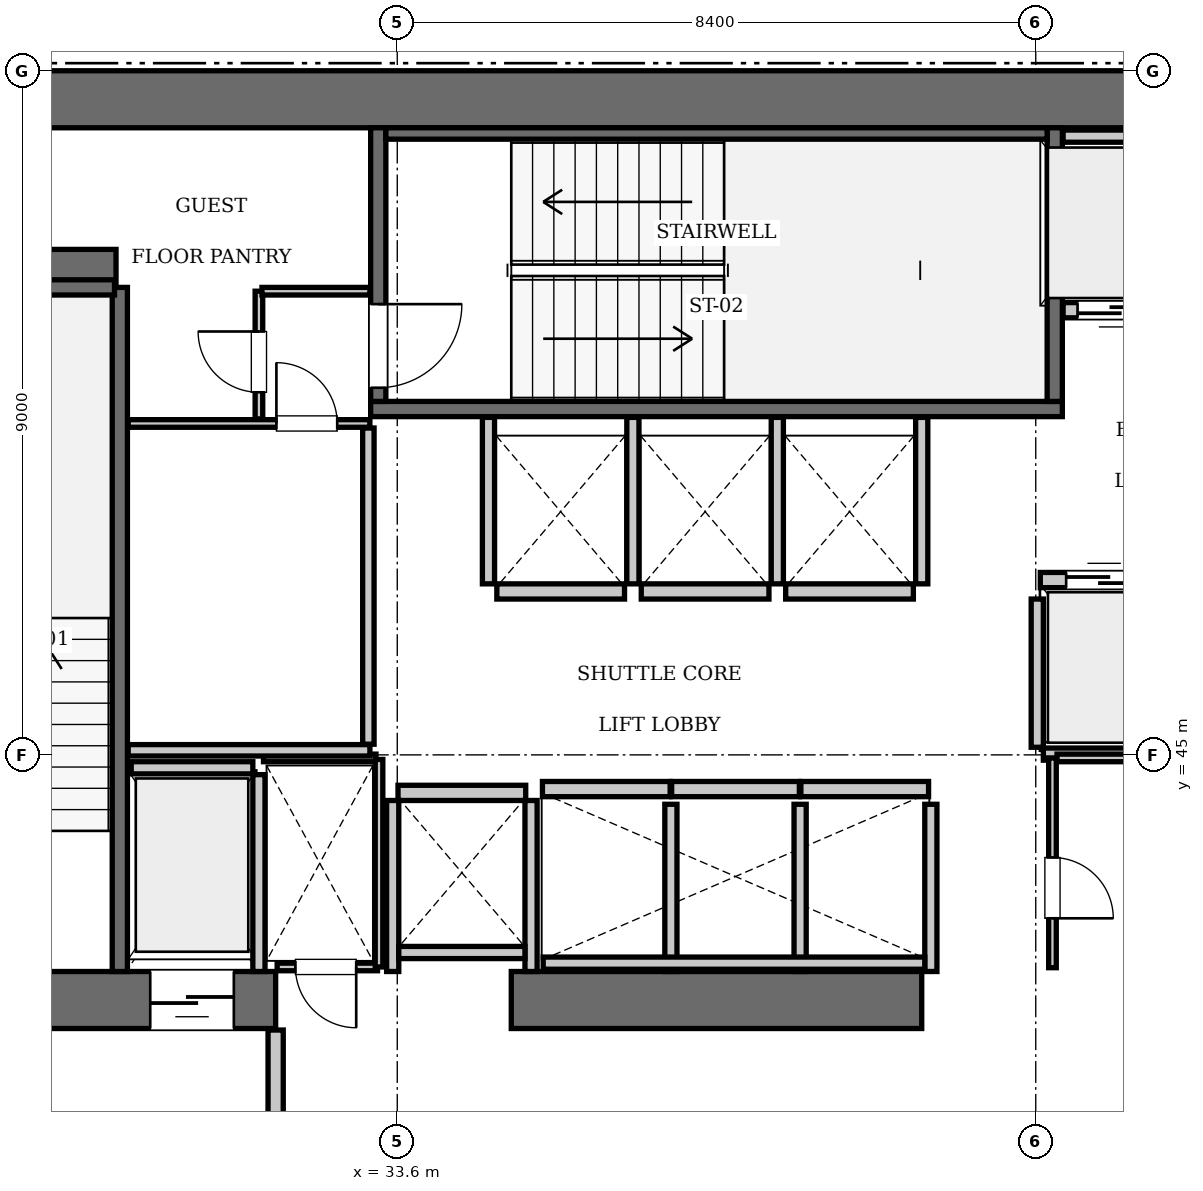
"""IFC4 building model, lengths in metres.
Left out: names, types, materials, properties, quantities, classifications, styles, units other than length and angle.
Written with IfcOpenShell. Run it as: python <this file> out.ifc"""

import sys

from ifc_helpers import new_model, si_unit, direction, frame, frame_2d, origin, place, context, subcontext, project, spatial, rectangle, extrude, element, fill, save


model = new_model("IFC4")
c1 = context("Model", 3, precision=1e-05, world=origin(), true_north=direction((0.0, 1.0)))
c2 = subcontext(c1, "Body", "Model", "MODEL_VIEW")
j1 = project(units=[si_unit("LENGTHUNIT", "METRE"), si_unit("PLANEANGLEUNIT", "RADIAN")], contexts=[c1])
p1 = place(None, origin())
s1 = spatial("IfcSite", under=j1, at=p1, CompositionType="ELEMENT")
p2 = place(p1, origin())
s2 = spatial("IfcBuilding", under=s1, at=p2, CompositionType="ELEMENT")
p3 = place(p2, frame((0.0, 0.0, 165.9)))
s3 = spatial("IfcBuildingStorey", under=s2, at=p3, CompositionType="ELEMENT", Elevation=165.9)
p4 = place(p3, frame((25.2, 53.625, 0.0), z_axis=(0.0, 0.0, 1.0), x_axis=(1.0, 0.0, 0.0)))
e1 = element("IfcWall", 1, at=p4, inside=s3, PredefinedType="SHEAR", context=c2, shape_type="SweptSolid", body=[
    extrude(rectangle(XDim=25.2, YDim=0.75, at=frame_2d((12.6, 0.0))), origin(), (0.0, 0.0, 1.0), 3.85),
])
p5 = place(p3, frame((25.2, 41.775, 0.0), z_axis=(0.0, 0.0, 1.0), x_axis=(1.0, 0.0, 0.0)))
e2 = element("IfcWall", 2, at=p5, inside=s3, PredefinedType="SHEAR", context=c2, shape_type="SweptSolid", body=[
    extrude(rectangle(XDim=6.8, YDim=0.75, at=frame_2d((3.4, 0.0))), origin(), (0.0, 0.0, 1.0), 3.85),
])
p6 = place(p5, frame((1.65, 0.0, 0.0)))
e3 = element("IfcOpeningElement", 3, at=p6, cuts=e2, PredefinedType="OPENING", context=c2, shape_type="SweptSolid", body=[
    extrude(rectangle(XDim=1.15, YDim=2.15, at=frame_2d((0.575, 1.075))), frame((0.0, 0.385, 0.0), z_axis=(0.0, -1.0, 0.0), x_axis=(1.0, 0.0, 0.0)), (0.0, 0.0, 1.0), 0.77),
])
p7 = place(p5, frame((5.15, 0.0, 0.0)))
e4 = element("IfcOpeningElement", 4, at=p7, cuts=e2, PredefinedType="OPENING", context=c2, shape_type="SweptSolid", body=[
    extrude(rectangle(XDim=1.1, YDim=2.2, at=frame_2d((0.55, 1.1))), frame((0.0, 0.385, 0.0), z_axis=(0.0, -1.0, 0.0), x_axis=(1.0, 0.0, 0.0)), (0.0, 0.0, 1.0), 0.77),
])
p8 = place(p3, frame((35.1, 41.775, 0.0), z_axis=(0.0, 0.0, 1.0), x_axis=(1.0, 0.0, 0.0)))
e5 = element("IfcWall", 5, at=p8, inside=s3, PredefinedType="SHEAR", context=c2, shape_type="SweptSolid", body=[
    extrude(rectangle(XDim=5.4, YDim=0.75, at=frame_2d((2.7, 0.0))), origin(), (0.0, 0.0, 1.0), 3.85),
])
p9 = place(p3, frame((25.95, 51.4, 0.0), z_axis=(0.0, 0.0, 1.0), x_axis=(1.0, 0.0, 0.0)))
e6 = element("IfcWall", 6, at=p9, inside=s3, PredefinedType="SHEAR", context=c2, shape_type="SweptSolid", body=[
    extrude(rectangle(XDim=3.95, YDim=0.5, at=frame_2d((1.975, 0.0))), origin(), (0.0, 0.0, 1.0), 3.85),
])
p10 = place(p3, frame((29.95, 42.15, 0.0), z_axis=(0.0, 0.0, 1.0), x_axis=(0.0, 1.0, 0.0)))
e7 = element("IfcWall", 7, at=p10, inside=s3, PredefinedType="SOLIDWALL", context=c2, shape_type="SweptSolid", body=[
    extrude(rectangle(XDim=9.0, YDim=0.2, at=frame_2d((4.5, 0.0))), origin(), (0.0, 0.0, 1.0), 3.61),
])
p11 = place(p3, frame((26.38, 51.15, 0.0), z_axis=(0.0, 0.0, 1.0), x_axis=(1.0, 0.0, 0.0)))
e8 = element("IfcWall", 8, at=p11, inside=s3, PredefinedType="SOLIDWALL", context=c2, shape_type="SweptSolid", body=[
    extrude(rectangle(XDim=3.5, YDim=0.2, at=frame_2d((1.75, 0.0))), origin(), (0.0, 0.0, 1.0), 3.61),
])
p12 = place(p3, frame((33.25, 49.55, 0.0), z_axis=(0.0, 0.0, 1.0), x_axis=(1.0, 0.0, 0.0)))
e9 = element("IfcWall", 9, at=p12, inside=s3, PredefinedType="SOLIDWALL", context=c2, shape_type="SweptSolid", body=[
    extrude(rectangle(XDim=9.1, YDim=0.2, at=frame_2d((4.55, 0.0))), origin(), (0.0, 0.0, 1.0), 3.61),
])
p13 = place(p3, frame((42.25, 49.65, 0.0), z_axis=(0.0, 0.0, 1.0), x_axis=(0.0, 1.0, 0.0)))
e10 = element("IfcWall", 10, at=p13, inside=s3, PredefinedType="SOLIDWALL", context=c2, shape_type="SweptSolid", body=[
    extrude(rectangle(XDim=3.6, YDim=0.2, at=frame_2d((1.8, 0.0))), origin(), (0.0, 0.0, 1.0), 3.61),
])
p14 = place(p3, frame((33.35, 49.65, 0.0), z_axis=(0.0, 0.0, 1.0), x_axis=(0.0, 1.0, 0.0)))
e11 = element("IfcWall", 11, at=p14, inside=s3, PredefinedType="SOLIDWALL", context=c2, shape_type="SweptSolid", body=[
    extrude(rectangle(XDim=3.6, YDim=0.2, at=frame_2d((1.8, 0.0))), origin(), (0.0, 0.0, 1.0), 3.61),
])
p15 = place(p14, frame((0.18, 0.0, 0.0)))
e12 = element("IfcOpeningElement", 12, at=p15, cuts=e11, PredefinedType="OPENING", context=c2, shape_type="SweptSolid", body=[
    extrude(rectangle(XDim=1.1, YDim=2.15, at=frame_2d((0.55, 1.075))), frame((0.0, 0.11, 0.0), z_axis=(0.0, -1.0, 0.0), x_axis=(1.0, 0.0, 0.0)), (0.0, 0.0, 1.0), 0.22),
])
p16 = place(p3, frame((33.45, 53.175, 0.0), z_axis=(0.0, 0.0, 1.0), x_axis=(1.0, 0.0, 0.0)))
e13 = element("IfcWall", 13, at=p16, inside=s3, PredefinedType="SOLIDWALL", context=c2, shape_type="SweptSolid", body=[
    extrude(rectangle(XDim=8.7, YDim=0.15, at=frame_2d((4.35, 0.0))), origin(), (0.0, 0.0, 1.0), 3.61),
])
p17 = place(p3, frame((42.06, 47.3, 0.0), z_axis=(0.0, 0.0, 1.0), x_axis=(1.0, 0.0, 0.0)))
e14 = element("IfcWall", 14, at=p17, inside=s3, PredefinedType="SOLIDWALL", context=c2, shape_type="SweptSolid", body=[
    extrude(rectangle(XDim=1.68, YDim=0.2, at=frame_2d((0.84, 0.0))), origin(), (0.0, 0.0, 1.0), 3.61),
])
p18 = place(p17, frame((0.34, 0.0, 0.0)))
e15 = element("IfcOpeningElement", 15, at=p18, cuts=e14, PredefinedType="OPENING", context=c2, shape_type="SweptSolid", body=[
    extrude(rectangle(XDim=1.0, YDim=2.15, at=frame_2d((0.5, 1.075))), frame((0.0, 0.11, 0.0), z_axis=(0.0, -1.0, 0.0), x_axis=(1.0, 0.0, 0.0)), (0.0, 0.0, 1.0), 0.22),
])
p19 = place(p3, frame((42.36, 50.85, 0.0), z_axis=(0.0, 0.0, 1.0), x_axis=(1.0, 0.0, 0.0)))
e16 = element("IfcWall", 16, at=p19, inside=s3, PredefinedType="SOLIDWALL", context=c2, shape_type="SweptSolid", body=[
    extrude(rectangle(XDim=1.38, YDim=0.2, at=frame_2d((0.69, 0.0))), origin(), (0.0, 0.0, 1.0), 3.61),
])
p20 = place(p19, frame((0.19, 0.0, 0.0)))
e17 = element("IfcOpeningElement", 17, at=p20, cuts=e16, PredefinedType="OPENING", context=c2, shape_type="SweptSolid", body=[
    extrude(rectangle(XDim=1.0, YDim=2.15, at=frame_2d((0.5, 1.075))), frame((0.0, 0.11, 0.0), z_axis=(0.0, -1.0, 0.0), x_axis=(1.0, 0.0, 0.0)), (0.0, 0.0, 1.0), 0.22),
])
for number, where, z_axis, x_axis in (
    (18, (35.51, 44.55, 0.0), (0.0, 0.0, 1.0), (1.0, 0.0, 0.0)),
    (19, (37.21, 44.55, 0.0), (0.0, 0.0, 1.0), (1.0, 0.0, 0.0)),
):
    element("IfcWall", number, at=place(p3, frame(where, z_axis=z_axis, x_axis=x_axis)), inside=s3, PredefinedType="SOLIDWALL", context=c2, shape_type="SweptSolid", body=[
        extrude(rectangle(XDim=1.68, YDim=0.2, at=frame_2d((0.84, 0.0))), origin(), (0.0, 0.0, 1.0), 3.61),
    ])
for number, where, z_axis, x_axis in (
    (20, (38.91, 44.55, 0.0), (0.0, 0.0, 1.0), (1.0, 0.0, 0.0)),
    (21, (34.91, 47.15, 0.0), (0.0, 0.0, 1.0), (1.0, 0.0, 0.0)),
):
    element("IfcWall", number, at=place(p3, frame(where, z_axis=z_axis, x_axis=x_axis)), inside=s3, PredefinedType="SOLIDWALL", context=c2, shape_type="SweptSolid", body=[
        extrude(rectangle(XDim=1.68, YDim=0.2, at=frame_2d((0.84, 0.0))), origin(), (0.0, 0.0, 1.0), 3.61),
    ])
for number, where, z_axis, x_axis in (
    (22, (36.81, 47.15, 0.0), (0.0, 0.0, 1.0), (1.0, 0.0, 0.0)),
    (23, (38.71, 47.15, 0.0), (0.0, 0.0, 1.0), (1.0, 0.0, 0.0)),
    (24, (33.61, 44.5, 0.0), (0.0, 0.0, 1.0), (1.0, 0.0, 0.0)),
):
    element("IfcWall", number, at=place(p3, frame(where, z_axis=z_axis, x_axis=x_axis)), inside=s3, PredefinedType="SOLIDWALL", context=c2, shape_type="SweptSolid", body=[
        extrude(rectangle(XDim=1.68, YDim=0.2, at=frame_2d((0.84, 0.0))), origin(), (0.0, 0.0, 1.0), 3.61),
    ])
p21 = place(p3, frame((30.1, 44.83, 0.0), z_axis=(0.0, 0.0, 1.0), x_axis=(1.0, 0.0, 0.0)))
e25 = element("IfcWall", 25, at=p21, inside=s3, PredefinedType="SOLIDWALL", context=c2, shape_type="SweptSolid", body=[
    extrude(rectangle(XDim=1.6, YDim=0.16, at=frame_2d((0.8, 0.0))), origin(), (0.0, 0.0, 1.0), 3.61),
])
p22 = place(p3, frame((31.78, 42.15, 0.0), z_axis=(0.0, 0.0, 1.0), x_axis=(0.0, 1.0, 0.0)))
e26 = element("IfcWall", 26, at=p22, inside=s3, PredefinedType="SOLIDWALL", context=c2, shape_type="SweptSolid", body=[
    extrude(rectangle(XDim=2.59, YDim=0.16, at=frame_2d((1.295, 0.0))), origin(), (0.0, 0.0, 1.0), 3.61),
])
p23 = place(p3, frame((42.02, 45.1, 0.0), z_axis=(0.0, 0.0, 1.0), x_axis=(0.0, 1.0, 0.0)))
e27 = element("IfcWall", 27, at=p23, inside=s3, PredefinedType="SOLIDWALL", context=c2, shape_type="SweptSolid", body=[
    extrude(rectangle(XDim=1.95, YDim=0.16, at=frame_2d((0.975, 0.0))), origin(), (0.0, 0.0, 1.0), 3.61),
])
p24 = place(p3, frame((42.1, 45.01, 0.0), z_axis=(0.0, 0.0, 1.0), x_axis=(1.0, 0.0, 0.0)))
e28 = element("IfcWall", 28, at=p24, inside=s3, PredefinedType="SOLIDWALL", context=c2, shape_type="SweptSolid", body=[
    extrude(rectangle(XDim=3.45, YDim=0.16, at=frame_2d((1.725, 0.0))), origin(), (0.0, 0.0, 1.0), 3.61),
])
p25 = place(p3, frame((42.36, 53.14, 0.0), z_axis=(0.0, 0.0, 1.0), x_axis=(1.0, 0.0, 0.0)))
e29 = element("IfcWall", 29, at=p25, inside=s3, PredefinedType="SOLIDWALL", context=c2, shape_type="SweptSolid", body=[
    extrude(rectangle(XDim=3.14, YDim=0.16, at=frame_2d((1.57, 0.0))), origin(), (0.0, 0.0, 1.0), 3.61),
])
for number, where, z_axis, x_axis in (
    (30, (37.2, 42.15, 0.0), (0.0, 0.0, 1.0), (0.0, 1.0, 0.0)),
    (31, (38.9, 42.15, 0.0), (0.0, 0.0, 1.0), (0.0, 1.0, 0.0)),
    (32, (40.62, 42.15, 0.0), (0.0, 0.0, 1.0), (0.0, 1.0, 0.0)),
):
    element("IfcWall", number, at=place(p3, frame(where, z_axis=z_axis, x_axis=x_axis)), inside=s3, PredefinedType="SOLIDWALL", context=c2, shape_type="SweptSolid", body=[
        extrude(rectangle(XDim=2.2, YDim=0.16, at=frame_2d((1.1, 0.0))), origin(), (0.0, 0.0, 1.0), 3.61),
    ])
p26 = place(p3, frame((35.52, 42.26, 0.0), z_axis=(0.0, 0.0, 1.0), x_axis=(1.0, 0.0, 0.0)))
e33 = element("IfcWall", 33, at=p26, inside=s3, PredefinedType="SOLIDWALL", context=c2, shape_type="SweptSolid", body=[
    extrude(rectangle(XDim=5.02, YDim=0.16, at=frame_2d((2.51, 0.0))), origin(), (0.0, 0.0, 1.0), 3.61),
])
for number, where, z_axis, x_axis in (
    (34, (34.8, 47.25, 0.0), (0.0, 0.0, 1.0), (0.0, 1.0, 0.0)),
    (35, (36.7, 47.25, 0.0), (0.0, 0.0, 1.0), (0.0, 1.0, 0.0)),
    (36, (38.6, 47.25, 0.0), (0.0, 0.0, 1.0), (0.0, 1.0, 0.0)),
    (37, (40.5, 47.25, 0.0), (0.0, 0.0, 1.0), (0.0, 1.0, 0.0)),
):
    element("IfcWall", number, at=place(p3, frame(where, z_axis=z_axis, x_axis=x_axis)), inside=s3, PredefinedType="SOLIDWALL", context=c2, shape_type="SweptSolid", body=[
        extrude(rectangle(XDim=2.19, YDim=0.16, at=frame_2d((1.095, 0.0))), origin(), (0.0, 0.0, 1.0), 3.61),
    ])
for number, where, z_axis, x_axis in (
    (38, (33.54, 42.15, 0.0), (0.0, 0.0, 1.0), (0.0, 1.0, 0.0)),
    (39, (35.36, 42.15, 0.0), (0.0, 0.0, 1.0), (0.0, 1.0, 0.0)),
):
    element("IfcWall", number, at=place(p3, frame(where, z_axis=z_axis, x_axis=x_axis)), inside=s3, PredefinedType="SOLIDWALL", context=c2, shape_type="SweptSolid", body=[
        extrude(rectangle(XDim=2.25, YDim=0.16, at=frame_2d((1.125, 0.0))), origin(), (0.0, 0.0, 1.0), 3.61),
    ])
p27 = place(p3, frame((33.62, 42.4, 0.0), z_axis=(0.0, 0.0, 1.0), x_axis=(1.0, 0.0, 0.0)))
e40 = element("IfcWall", 40, at=p27, inside=s3, PredefinedType="SOLIDWALL", context=c2, shape_type="SweptSolid", body=[
    extrude(rectangle(XDim=1.66, YDim=0.16, at=frame_2d((0.83, 0.0))), origin(), (0.0, 0.0, 1.0), 3.61),
])
p28 = place(p3, frame((32.0, 38.31, 0.0), z_axis=(0.0, 0.0, 1.0), x_axis=(0.0, 1.0, 0.0)))
e41 = element("IfcWall", 41, at=p28, inside=s3, PredefinedType="PARTITIONING", context=c2, shape_type="SweptSolid", body=[
    extrude(rectangle(XDim=3.07, YDim=0.2, at=frame_2d((1.535, 0.0))), origin(), (0.0, 0.0, 1.0), 3.61),
])
p29 = place(p3, frame((32.02, 42.21, 0.0), z_axis=(0.0, 0.0, 1.0), x_axis=(1.0, 0.0, 0.0)))
e42 = element("IfcWall", 42, at=p29, inside=s3, PredefinedType="PARTITIONING", context=c2, shape_type="SweptSolid", body=[
    extrude(rectangle(XDim=1.32, YDim=0.1, at=frame_2d((0.66, 0.0))), origin(), (0.0, 0.0, 1.0), 3.61),
])
p30 = place(p29, frame((0.24, 0.0, 0.0)))
e43 = element("IfcOpeningElement", 43, at=p30, cuts=e42, PredefinedType="OPENING", context=c2, shape_type="SweptSolid", body=[
    extrude(rectangle(XDim=0.8, YDim=2.05, at=frame_2d((0.4, 1.025))), frame((0.0, 0.06, 0.0), z_axis=(0.0, -1.0, 0.0), x_axis=(1.0, 0.0, 0.0)), (0.0, 0.0, 1.0), 0.12),
])
p31 = place(p3, frame((31.84, 44.96, 0.0), z_axis=(0.0, 0.0, 1.0), x_axis=(1.0, 0.0, 0.0)))
e44 = element("IfcWall", 44, at=p31, inside=s3, PredefinedType="PARTITIONING", context=c2, shape_type="SweptSolid", body=[
    extrude(rectangle(XDim=1.48, YDim=0.1, at=frame_2d((0.74, 0.0))), origin(), (0.0, 0.0, 1.0), 3.61),
])
p32 = place(p3, frame((33.36, 42.21, 0.0), z_axis=(0.0, 0.0, 1.0), x_axis=(0.0, 1.0, 0.0)))
e45 = element("IfcWall", 45, at=p32, inside=s3, PredefinedType="PARTITIONING", context=c2, shape_type="SweptSolid", body=[
    extrude(rectangle(XDim=2.73, YDim=0.1, at=frame_2d((1.365, 0.0))), origin(), (0.0, 0.0, 1.0), 3.61),
])
p33 = place(p3, frame((42.22, 42.2, 0.0), z_axis=(0.0, 0.0, 1.0), x_axis=(0.0, 1.0, 0.0)))
e46 = element("IfcWall", 46, at=p33, inside=s3, PredefinedType="PARTITIONING", context=c2, shape_type="SweptSolid", body=[
    extrude(rectangle(XDim=2.76, YDim=0.1, at=frame_2d((1.38, 0.0))), origin(), (0.0, 0.0, 1.0), 3.61),
])
p34 = place(p33, frame((0.65, 0.0, 0.0)))
e47 = element("IfcOpeningElement", 47, at=p34, cuts=e46, PredefinedType="OPENING", context=c2, shape_type="SweptSolid", body=[
    extrude(rectangle(XDim=0.8, YDim=2.05, at=frame_2d((0.4, 1.025))), frame((0.0, 0.06, 0.0), z_axis=(0.0, -1.0, 0.0), x_axis=(1.0, 0.0, 0.0)), (0.0, 0.0, 1.0), 0.12),
])
p35 = place(p3, frame((42.28, 44.96, 0.0), z_axis=(0.0, 0.0, 1.0), x_axis=(1.0, 0.0, 0.0)))
e48 = element("IfcWall", 48, at=p35, inside=s3, PredefinedType="PARTITIONING", context=c2, shape_type="SweptSolid", body=[
    extrude(rectangle(XDim=1.3, YDim=0.1, at=frame_2d((0.65, 0.0))), origin(), (0.0, 0.0, 1.0), 3.61),
])
p36 = place(p3, frame((30.06, 45.06, 0.0), z_axis=(0.0, 0.0, 1.0), x_axis=(1.0, 0.0, 0.0)))
e49 = element("IfcWall", 49, at=p36, inside=s3, PredefinedType="PARTITIONING", context=c2, shape_type="SweptSolid", body=[
    extrude(rectangle(XDim=3.18, YDim=0.15, at=frame_2d((1.59, 0.0))), origin(), (0.0, 0.0, 1.0), 3.61),
])
p37 = place(p3, frame((33.22, 45.14, 0.0), z_axis=(0.0, 0.0, 1.0), x_axis=(0.0, 1.0, 0.0)))
e50 = element("IfcWall", 50, at=p37, inside=s3, PredefinedType="PARTITIONING", context=c2, shape_type="SweptSolid", body=[
    extrude(rectangle(XDim=4.16, YDim=0.15, at=frame_2d((2.08, 0.0))), origin(), (0.0, 0.0, 1.0), 3.61),
])
p38 = place(p3, frame((30.06, 49.36, 0.0), z_axis=(0.0, 0.0, 1.0), x_axis=(1.0, 0.0, 0.0)))
e51 = element("IfcWall", 51, at=p38, inside=s3, PredefinedType="PARTITIONING", context=c2, shape_type="SweptSolid", body=[
    extrude(rectangle(XDim=3.18, YDim=0.1, at=frame_2d((1.59, 0.0))), origin(), (0.0, 0.0, 1.0), 3.61),
])
p39 = place(p38, frame((1.95, 0.0, 0.0)))
e52 = element("IfcOpeningElement", 52, at=p39, cuts=e51, PredefinedType="OPENING", context=c2, shape_type="SweptSolid", body=[
    extrude(rectangle(XDim=0.8, YDim=2.05, at=frame_2d((0.4, 1.025))), frame((0.0, 0.06, 0.0), z_axis=(0.0, -1.0, 0.0), x_axis=(1.0, 0.0, 0.0)), (0.0, 0.0, 1.0), 0.12),
])
p40 = place(p3, frame((31.78, 49.42, 0.0), z_axis=(0.0, 0.0, 1.0), x_axis=(0.0, 1.0, 0.0)))
e53 = element("IfcWall", 53, at=p40, inside=s3, PredefinedType="PARTITIONING", context=c2, shape_type="SweptSolid", body=[
    extrude(rectangle(XDim=1.68, YDim=0.1, at=frame_2d((0.84, 0.0))), origin(), (0.0, 0.0, 1.0), 3.61),
])
p41 = place(p40, frame((0.35, 0.0, 0.0)))
e54 = element("IfcOpeningElement", 54, at=p41, cuts=e53, PredefinedType="OPENING", context=c2, shape_type="SweptSolid", body=[
    extrude(rectangle(XDim=0.8, YDim=2.05, at=frame_2d((0.4, 1.025))), frame((0.0, 0.06, 0.0), z_axis=(0.0, -1.0, 0.0), x_axis=(1.0, 0.0, 0.0)), (0.0, 0.0, 1.0), 0.12),
])
p42 = place(p3, frame((31.82, 51.1, 0.0), z_axis=(0.0, 0.0, 1.0), x_axis=(1.0, 0.0, 0.0)))
e55 = element("IfcWall", 55, at=p42, inside=s3, PredefinedType="PARTITIONING", context=c2, shape_type="SweptSolid", body=[
    extrude(rectangle(XDim=1.42, YDim=0.1, at=frame_2d((0.71, 0.0))), origin(), (0.0, 0.0, 1.0), 3.61),
])
p43 = place(p15, frame((1.1, 0.0, 0.0), z_axis=(0.0, 0.0, 1.0), x_axis=(-1.0, 0.0, 0.0)))
e56 = element("IfcDoor", 56, at=p43, inside=s3, OperationType="SINGLE_SWING_LEFT", PredefinedType="DOOR", context=c2, shape_type="SweptSolid", body=[
    extrude(rectangle(XDim=1.1, YDim=2.15, at=frame_2d((0.55, 1.075))), frame((0.0, 0.025, 0.0), z_axis=(0.0, -1.0, 0.0), x_axis=(1.0, 0.0, 0.0)), (0.0, 0.0, 1.0), 0.05),
])
fill(e12, e56)
p44 = place(p18, origin())
e57 = element("IfcDoor", 57, at=p44, inside=s3, OperationType="SLIDING_TO_LEFT", PredefinedType="DOOR", context=c2, shape_type="SweptSolid", body=[
    extrude(rectangle(XDim=1.0, YDim=2.15, at=frame_2d((0.5, 1.075))), frame((0.0, 0.025, 0.0), z_axis=(0.0, -1.0, 0.0), x_axis=(1.0, 0.0, 0.0)), (0.0, 0.0, 1.0), 0.05),
])
fill(e15, e57)
p45 = place(p20, frame((1.0, 0.0, 0.0), z_axis=(0.0, 0.0, 1.0), x_axis=(-1.0, 0.0, 0.0)))
e58 = element("IfcDoor", 58, at=p45, inside=s3, OperationType="SLIDING_TO_LEFT", PredefinedType="DOOR", context=c2, shape_type="SweptSolid", body=[
    extrude(rectangle(XDim=1.0, YDim=2.15, at=frame_2d((0.5, 1.075))), frame((0.0, 0.025, 0.0), z_axis=(0.0, -1.0, 0.0), x_axis=(1.0, 0.0, 0.0)), (0.0, 0.0, 1.0), 0.05),
])
fill(e17, e58)
p46 = place(p7, frame((1.1, 0.0, 0.0), z_axis=(0.0, 0.0, 1.0), x_axis=(-1.0, 0.0, 0.0)))
e59 = element("IfcDoor", 59, at=p46, inside=s3, OperationType="SLIDING_TO_LEFT", PredefinedType="DOOR", context=c2, shape_type="SweptSolid", body=[
    extrude(rectangle(XDim=1.1, YDim=2.2, at=frame_2d((0.55, 1.1))), frame((0.0, 0.025, 0.0), z_axis=(0.0, -1.0, 0.0), x_axis=(1.0, 0.0, 0.0)), (0.0, 0.0, 1.0), 0.05),
])
fill(e4, e59)
p47 = place(p30, frame((0.8, 0.0, 0.0), z_axis=(0.0, 0.0, 1.0), x_axis=(-1.0, 0.0, 0.0)))
e60 = element("IfcDoor", 60, at=p47, inside=s3, OperationType="SINGLE_SWING_LEFT", PredefinedType="DOOR", context=c2, shape_type="SweptSolid", body=[
    extrude(rectangle(XDim=0.8, YDim=2.05, at=frame_2d((0.4, 1.025))), frame((0.0, 0.025, 0.0), z_axis=(0.0, -1.0, 0.0), x_axis=(1.0, 0.0, 0.0)), (0.0, 0.0, 1.0), 0.05),
])
fill(e43, e60)
p48 = place(p34, frame((0.8, 0.0, 0.0), z_axis=(0.0, 0.0, 1.0), x_axis=(-1.0, 0.0, 0.0)))
e61 = element("IfcDoor", 61, at=p48, inside=s3, OperationType="SINGLE_SWING_RIGHT", PredefinedType="DOOR", context=c2, shape_type="SweptSolid", body=[
    extrude(rectangle(XDim=0.8, YDim=2.05, at=frame_2d((0.4, 1.025))), frame((0.0, 0.025, 0.0), z_axis=(0.0, -1.0, 0.0), x_axis=(1.0, 0.0, 0.0)), (0.0, 0.0, 1.0), 0.05),
])
fill(e47, e61)
p49 = place(p39, origin())
e62 = element("IfcDoor", 62, at=p49, inside=s3, OperationType="SINGLE_SWING_LEFT", PredefinedType="DOOR", context=c2, shape_type="SweptSolid", body=[
    extrude(rectangle(XDim=0.8, YDim=2.05, at=frame_2d((0.4, 1.025))), frame((0.0, 0.025, 0.0), z_axis=(0.0, -1.0, 0.0), x_axis=(1.0, 0.0, 0.0)), (0.0, 0.0, 1.0), 0.05),
])
fill(e52, e62)
p50 = place(p41, origin())
e63 = element("IfcDoor", 63, at=p50, inside=s3, OperationType="SINGLE_SWING_RIGHT", PredefinedType="DOOR", context=c2, shape_type="SweptSolid", body=[
    extrude(rectangle(XDim=0.8, YDim=2.05, at=frame_2d((0.4, 1.025))), frame((0.0, 0.025, 0.0), z_axis=(0.0, -1.0, 0.0), x_axis=(1.0, 0.0, 0.0)), (0.0, 0.0, 1.0), 0.05),
])
fill(e54, e63)
save(model, sys.argv[1])
